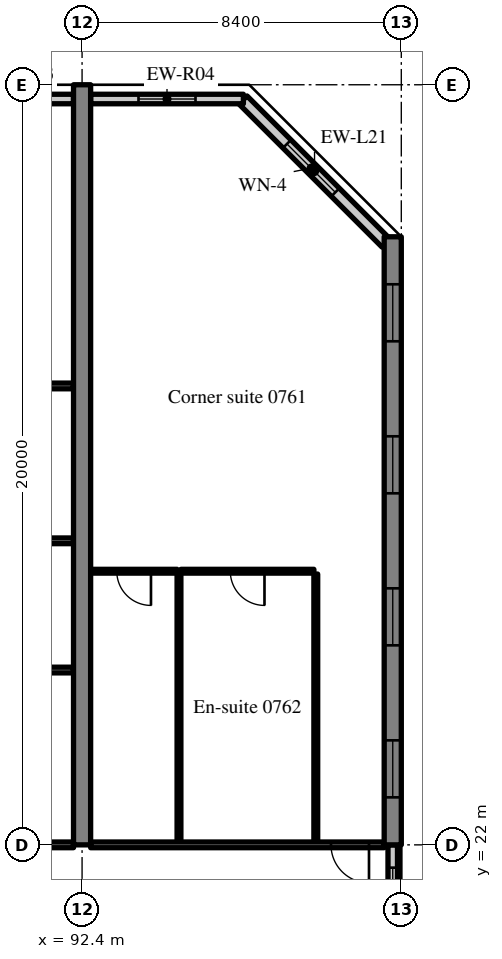
"""IFC4 building model, lengths in metres.
Left out: names, types, materials, properties, quantities, classifications, styles, units other than length and angle.
Written with IfcOpenShell. Run it as: python <this file> out.ifc"""

import sys

from ifc_helpers import new_model, si_unit, direction, frame, frame_2d, origin, place, context, subcontext, project, spatial, rectangle, extrude, source, transform, mapped, element, fill, save


model = new_model("IFC4")
c1 = context("Model", 3, precision=1e-05, world=origin(), true_north=direction((0.0, 1.0)))
c2 = subcontext(c1, "Body", "Model", "MODEL_VIEW")
j1 = project(units=[si_unit("LENGTHUNIT", "METRE"), si_unit("PLANEANGLEUNIT", "RADIAN")], contexts=[c1])
p1 = place(None, origin())
s1 = spatial("IfcSite", under=j1, at=p1, CompositionType="ELEMENT")
p2 = place(p1, origin())
s2 = spatial("IfcBuilding", under=s1, at=p2, CompositionType="ELEMENT")
p3 = place(p2, frame((0.0, 0.0, 35.4)))
s3 = spatial("IfcBuildingStorey", under=s2, at=p3, CompositionType="ELEMENT", Elevation=35.4)
m1 = source(origin(), c2, "Body", "SweptSolid", [
    extrude(rectangle(XDim=20.0, YDim=0.45, at=frame_2d((10.0, 0.0))), origin(), (0.0, 0.0, 1.0), 3.52),
])
p4 = place(p3, frame((92.4, 22.0, 0.0), z_axis=(0.0, 0.0, 1.0), x_axis=(0.0, 1.0, 0.0)))
e1 = element("IfcWall", 1, at=p4, inside=s3, PredefinedType="SHEAR", context=c2, shape_type="MappedRepresentation", body=[
    mapped(m1, transform((0.0, 0.0, 0.0), scale=1.0)),
])
m2 = source(origin(), c2, "Body", "SweptSolid", [
    extrude(rectangle(XDim=16.0, YDim=0.45, at=frame_2d((8.0, 0.0))), origin(), (0.0, 0.0, 1.0), 3.52),
])
p5 = place(p3, frame((100.575, 22.0, 0.0), z_axis=(0.0, 0.0, 1.0), x_axis=(0.0, 1.0, 0.0)))
e2 = element("IfcWall", 2, at=p5, inside=s3, PredefinedType="SHEAR", context=c2, shape_type="MappedRepresentation", body=[
    mapped(m2, transform((0.0, 0.0, 0.0), scale=1.0)),
])
m3 = source(origin(), c2, "Body", "SweptSolid", [
    extrude(rectangle(XDim=1.5, YDim=1.5, at=frame_2d((0.75, 0.75))), frame((0.0, 0.235, 0.0), z_axis=(0.0, -1.0, 0.0), x_axis=(1.0, 0.0, 0.0)), (0.0, 0.0, 1.0), 0.47),
])
p6 = place(p5, frame((1.25, 0.0, 0.9)))
e3 = element("IfcOpeningElement", 3, at=p6, cuts=e2, PredefinedType="OPENING", context=c2, shape_type="MappedRepresentation", body=[
    mapped(m3, transform((0.0, 0.0, 0.0), scale=1.0)),
])
p7 = place(p5, frame((5.25, 0.0, 0.9)))
e4 = element("IfcOpeningElement", 4, at=p7, cuts=e2, PredefinedType="OPENING", context=c2, shape_type="MappedRepresentation", body=[
    mapped(m3, transform((0.0, 0.0, 0.0), scale=1.0)),
])
p8 = place(p5, frame((9.25, 0.0, 0.9)))
e5 = element("IfcOpeningElement", 5, at=p8, cuts=e2, PredefinedType="OPENING", context=c2, shape_type="MappedRepresentation", body=[
    mapped(m3, transform((0.0, 0.0, 0.0), scale=1.0)),
])
p9 = place(p5, frame((13.25, 0.0, 0.9)))
e6 = element("IfcOpeningElement", 6, at=p9, cuts=e2, PredefinedType="OPENING", context=c2, shape_type="MappedRepresentation", body=[
    mapped(m3, transform((0.0, 0.0, 0.0), scale=1.0)),
])
m4 = source(origin(), c2, "Body", "SweptSolid", [
    extrude(rectangle(XDim=5.326, YDim=0.3, at=frame_2d((2.663, 0.0))), origin(), (0.0, 0.0, 1.0), 3.52),
])
p10 = place(p3, frame((100.4, 37.834, 0.0), z_axis=(0.0, 0.0, 1.0), x_axis=(-0.707083859269, 0.707129702361, 0.0)))
e7 = element("IfcWall", 7, at=p10, inside=s3, PredefinedType="SOLIDWALL", context=c2, shape_type="MappedRepresentation", body=[
    mapped(m4, transform((0.0, 0.0, 0.0), scale=1.0)),
])
m5 = source(origin(), c2, "Body", "SweptSolid", [
    extrude(rectangle(XDim=1.8, YDim=1.5, at=frame_2d((0.9, 0.75))), frame((0.0, 0.16, 0.0), z_axis=(0.0, -1.0, 0.0), x_axis=(1.0, 0.0, 0.0)), (0.0, 0.0, 1.0), 0.32),
])
p11 = place(p10, frame((1.889, 0.0, 0.9)))
e8 = element("IfcOpeningElement", 8, at=p11, cuts=e7, PredefinedType="OPENING", context=c2, shape_type="MappedRepresentation", body=[
    mapped(m5, transform((0.0, 0.0, 0.0), scale=1.0)),
])
m6 = source(origin(), c2, "Body", "SweptSolid", [
    extrude(rectangle(XDim=3.525, YDim=0.25, at=frame_2d((1.763, 0.0))), origin(), (0.0, 0.0, 1.0), 2.77),
])
p12 = place(p3, frame((92.175, 41.625, 0.0), z_axis=(0.0, 0.0, 1.0), x_axis=(-1.0, 0.0, 0.0)))
e9 = element("IfcWall", 9, at=p12, inside=s3, PredefinedType="SOLIDWALL", context=c2, shape_type="MappedRepresentation", body=[
    mapped(m6, transform((0.0, 0.0, 0.0), scale=1.0)),
])
m7 = source(origin(), c2, "Body", "SweptSolid", [
    extrude(rectangle(XDim=1.5, YDim=1.5, at=frame_2d((0.75, 0.75))), frame((0.0, 0.135, 0.0), z_axis=(0.0, -1.0, 0.0), x_axis=(1.0, 0.0, 0.0)), (0.0, 0.0, 1.0), 0.27),
])
p13 = place(p12, frame((1.012, 0.0, 0.9)))
e10 = element("IfcOpeningElement", 10, at=p13, cuts=e9, PredefinedType="OPENING", context=c2, shape_type="MappedRepresentation", body=[
    mapped(m7, transform((0.0, 0.0, 0.0), scale=1.0)),
])
m8 = source(origin(), c2, "Body", "SweptSolid", [
    extrude(rectangle(XDim=4.02, YDim=0.25, at=frame_2d((2.01, 0.0))), origin(), (0.0, 0.0, 1.0), 2.77),
])
p14 = place(p3, frame((96.645, 41.625, 0.0), z_axis=(0.0, 0.0, 1.0), x_axis=(-1.0, 0.0, 0.0)))
e11 = element("IfcWall", 11, at=p14, inside=s3, PredefinedType="SOLIDWALL", context=c2, shape_type="MappedRepresentation", body=[
    mapped(m8, transform((0.0, 0.0, 0.0), scale=1.0)),
])
p15 = place(p14, frame((1.26, 0.0, 0.9)))
e12 = element("IfcOpeningElement", 12, at=p15, cuts=e11, PredefinedType="OPENING", context=c2, shape_type="MappedRepresentation", body=[
    mapped(m7, transform((0.0, 0.0, 0.0), scale=1.0)),
])
m9 = source(origin(), c2, "Body", "SweptSolid", [
    extrude(rectangle(XDim=2.4, YDim=0.25, at=frame_2d((1.2, 0.0))), origin(), (0.0, 0.0, 1.0), 2.62),
])
p16 = place(p3, frame((100.575, 19.6, 0.0), z_axis=(0.0, 0.0, 1.0), x_axis=(0.0, 1.0, 0.0)))
e13 = element("IfcWall", 13, at=p16, inside=s3, PredefinedType="SOLIDWALL", context=c2, shape_type="MappedRepresentation", body=[
    mapped(m9, transform((0.0, 0.0, 0.0), scale=1.0)),
])
m10 = source(origin(), c2, "Body", "SweptSolid", [
    extrude(rectangle(XDim=1.2, YDim=1.5, at=frame_2d((0.6, 0.75))), frame((0.0, 0.135, 0.0), z_axis=(0.0, -1.0, 0.0), x_axis=(1.0, 0.0, 0.0)), (0.0, 0.0, 1.0), 0.27),
])
p17 = place(p16, frame((0.6, 0.0, 0.9)))
e14 = element("IfcOpeningElement", 14, at=p17, cuts=e13, PredefinedType="OPENING", context=c2, shape_type="MappedRepresentation", body=[
    mapped(m10, transform((0.0, 0.0, 0.0), scale=1.0)),
])
m11 = source(origin(), c2, "Body", "SweptSolid", [
    extrude(rectangle(XDim=5.4, YDim=0.15, at=frame_2d((2.7, 0.0))), origin(), (0.0, 0.0, 1.0), 2.82),
])
p18 = place(p3, frame((86.775, 22.0, 0.0), z_axis=(0.0, 0.0, 1.0), x_axis=(1.0, 0.0, 0.0)))
e15 = element("IfcWall", 15, at=p18, inside=s3, PredefinedType="PARTITIONING", context=c2, shape_type="MappedRepresentation", body=[
    mapped(m11, transform((0.0, 0.0, 0.0), scale=1.0)),
])
m12 = source(origin(), c2, "Body", "SweptSolid", [
    extrude(rectangle(XDim=5.4, YDim=0.15, at=frame_2d((2.7, 0.0))), origin(), (0.0, 0.0, 1.0), 3.52),
])
for number, where, z_axis, x_axis in (
    (16, (86.775, 26.6, 0.0), (0.0, 0.0, 1.0), (1.0, 0.0, 0.0)),
    (17, (86.775, 30.0, 0.0), (0.0, 0.0, 1.0), (1.0, 0.0, 0.0)),
):
    element("IfcWall", number, at=place(p3, frame(where, z_axis=z_axis, x_axis=x_axis)), inside=s3, PredefinedType="PARTITIONING", context=c2, shape_type="MappedRepresentation", body=[
        mapped(m12, transform((0.0, 0.0, 0.0), scale=1.0)),
    ])
m13 = source(origin(), c2, "Body", "SweptSolid", [
    extrude(rectangle(XDim=7.95, YDim=0.15, at=frame_2d((3.975, 0.0))), origin(), (0.0, 0.0, 1.0), 3.52),
])
p19 = place(p3, frame((84.225, 34.075, 0.0), z_axis=(0.0, 0.0, 1.0), x_axis=(1.0, 0.0, 0.0)))
e18 = element("IfcWall", 18, at=p19, inside=s3, PredefinedType="PARTITIONING", context=c2, shape_type="MappedRepresentation", body=[
    mapped(m13, transform((0.0, 0.0, 0.0), scale=1.0)),
])
m14 = source(origin(), c2, "Body", "SweptSolid", [
    extrude(rectangle(XDim=1.0, YDim=2.1, at=frame_2d((0.5, 1.05))), frame((0.0, 0.085, 0.0), z_axis=(0.0, -1.0, 0.0), x_axis=(1.0, 0.0, 0.0)), (0.0, 0.0, 1.0), 0.17),
])
p20 = place(p19, frame((0.7, 0.0, 0.0)))
e19 = element("IfcOpeningElement", 19, at=p20, cuts=e18, PredefinedType="OPENING", context=c2, shape_type="MappedRepresentation", body=[
    mapped(m14, transform((0.0, 0.0, 0.0), scale=1.0)),
])
m15 = source(origin(), c2, "Body", "SweptSolid", [
    extrude(rectangle(XDim=7.05, YDim=0.1, at=frame_2d((3.525, 0.0))), origin(), (0.0, 0.0, 1.0), 3.52),
])
for number, where, z_axis, x_axis in (
    (20, (98.55, 22.075, 0.0), (0.0, 0.0, 1.0), (0.0, 1.0, 0.0)),
    (21, (94.95, 22.075, 0.0), (0.0, 0.0, 1.0), (0.0, 1.0, 0.0)),
):
    element("IfcWall", number, at=place(p3, frame(where, z_axis=z_axis, x_axis=x_axis)), inside=s3, PredefinedType="PARTITIONING", context=c2, shape_type="MappedRepresentation", body=[
        mapped(m15, transform((0.0, 0.0, 0.0), scale=1.0)),
    ])
m16 = source(origin(), c2, "Body", "SweptSolid", [
    extrude(rectangle(XDim=3.5, YDim=0.1, at=frame_2d((1.75, 0.0))), origin(), (0.0, 0.0, 1.0), 3.52),
])
p21 = place(p3, frame((95.0, 29.2, 0.0), z_axis=(0.0, 0.0, 1.0), x_axis=(1.0, 0.0, 0.0)))
e22 = element("IfcWall", 22, at=p21, inside=s3, PredefinedType="PARTITIONING", context=c2, shape_type="MappedRepresentation", body=[
    mapped(m16, transform((0.0, 0.0, 0.0), scale=1.0)),
])
m17 = source(origin(), c2, "Body", "SweptSolid", [
    extrude(rectangle(XDim=0.9, YDim=2.1, at=frame_2d((0.45, 1.05))), frame((0.0, 0.06, 0.0), z_axis=(0.0, -1.0, 0.0), x_axis=(1.0, 0.0, 0.0)), (0.0, 0.0, 1.0), 0.12),
])
p22 = place(p21, frame((1.3, 0.0, 0.0)))
e23 = element("IfcOpeningElement", 23, at=p22, cuts=e22, PredefinedType="OPENING", context=c2, shape_type="MappedRepresentation", body=[
    mapped(m17, transform((0.0, 0.0, 0.0), scale=1.0)),
])
m18 = source(origin(), c2, "Body", "SweptSolid", [
    extrude(rectangle(XDim=2.275, YDim=0.1, at=frame_2d((1.137, 0.0))), origin(), (0.0, 0.0, 1.0), 3.52),
])
p23 = place(p3, frame((92.625, 29.2, 0.0), z_axis=(0.0, 0.0, 1.0), x_axis=(1.0, 0.0, 0.0)))
e24 = element("IfcWall", 24, at=p23, inside=s3, PredefinedType="PARTITIONING", context=c2, shape_type="MappedRepresentation", body=[
    mapped(m18, transform((0.0, 0.0, 0.0), scale=1.0)),
])
p24 = place(p23, frame((0.688, 0.0, 0.0)))
e25 = element("IfcOpeningElement", 25, at=p24, cuts=e24, PredefinedType="OPENING", context=c2, shape_type="MappedRepresentation", body=[
    mapped(m17, transform((0.0, 0.0, 0.0), scale=1.0)),
])
m19 = source(origin(), c2, "Body", "SweptSolid", [
    extrude(rectangle(XDim=7.725, YDim=0.15, at=frame_2d((3.863, 0.0))), origin(), (0.0, 0.0, 1.0), 2.82),
])
p25 = place(p3, frame((92.625, 22.0, 0.0), z_axis=(0.0, 0.0, 1.0), x_axis=(1.0, 0.0, 0.0)))
e26 = element("IfcWall", 26, at=p25, inside=s3, PredefinedType="PARTITIONING", context=c2, shape_type="MappedRepresentation", body=[
    mapped(m19, transform((0.0, 0.0, 0.0), scale=1.0)),
])
p26 = place(p25, frame((6.325, 0.0, 0.0)))
e27 = element("IfcOpeningElement", 27, at=p26, cuts=e26, PredefinedType="OPENING", context=c2, shape_type="MappedRepresentation", body=[
    mapped(m14, transform((0.0, 0.0, 0.0), scale=1.0)),
])
m20 = source(origin(), c2, "Body", "SweptSolid", [
    extrude(rectangle(XDim=1.8, YDim=1.5, at=frame_2d((0.9, 0.75))), frame((0.0, 0.03, 0.0), z_axis=(0.0, -1.0, 0.0), x_axis=(1.0, 0.0, 0.0)), (0.0, 0.0, 1.0), 0.06),
])
p27 = place(p11, origin())
e28 = element("IfcWindow", 28, at=p27, inside=s3, PartitioningType="SINGLE_PANEL", PredefinedType="WINDOW", context=c2, shape_type="MappedRepresentation", body=[
    mapped(m20, transform((0.0, 0.0, 0.0), scale=1.0)),
])
fill(e8, e28)
m21 = source(origin(), c2, "Body", "SweptSolid", [
    extrude(rectangle(XDim=1.5, YDim=1.5, at=frame_2d((0.75, 0.75))), frame((0.0, 0.03, 0.0), z_axis=(0.0, -1.0, 0.0), x_axis=(1.0, 0.0, 0.0)), (0.0, 0.0, 1.0), 0.06),
])
p28 = place(p15, origin())
e29 = element("IfcWindow", 29, at=p28, inside=s3, PartitioningType="SINGLE_PANEL", PredefinedType="WINDOW", context=c2, shape_type="MappedRepresentation", body=[
    mapped(m21, transform((0.0, 0.0, 0.0), scale=1.0)),
])
fill(e12, e29)
p29 = place(p6, origin())
e30 = element("IfcWindow", 30, at=p29, inside=s3, PartitioningType="SINGLE_PANEL", PredefinedType="WINDOW", context=c2, shape_type="MappedRepresentation", body=[
    mapped(m21, transform((0.0, 0.0, 0.0), scale=1.0)),
])
fill(e3, e30)
p30 = place(p7, origin())
e31 = element("IfcWindow", 31, at=p30, inside=s3, PartitioningType="SINGLE_PANEL", PredefinedType="WINDOW", context=c2, shape_type="MappedRepresentation", body=[
    mapped(m21, transform((0.0, 0.0, 0.0), scale=1.0)),
])
fill(e4, e31)
p31 = place(p8, origin())
e32 = element("IfcWindow", 32, at=p31, inside=s3, PartitioningType="SINGLE_PANEL", PredefinedType="WINDOW", context=c2, shape_type="MappedRepresentation", body=[
    mapped(m21, transform((0.0, 0.0, 0.0), scale=1.0)),
])
fill(e5, e32)
p32 = place(p9, origin())
e33 = element("IfcWindow", 33, at=p32, inside=s3, PartitioningType="SINGLE_PANEL", PredefinedType="WINDOW", context=c2, shape_type="MappedRepresentation", body=[
    mapped(m21, transform((0.0, 0.0, 0.0), scale=1.0)),
])
fill(e6, e33)
m22 = source(origin(), c2, "Body", "SweptSolid", [
    extrude(rectangle(XDim=1.2, YDim=1.5, at=frame_2d((0.6, 0.75))), frame((0.0, 0.03, 0.0), z_axis=(0.0, -1.0, 0.0), x_axis=(1.0, 0.0, 0.0)), (0.0, 0.0, 1.0), 0.06),
])
p33 = place(p17, origin())
e34 = element("IfcWindow", 34, at=p33, inside=s3, PartitioningType="SINGLE_PANEL", PredefinedType="WINDOW", context=c2, shape_type="MappedRepresentation", body=[
    mapped(m22, transform((0.0, 0.0, 0.0), scale=1.0)),
])
fill(e14, e34)
m23 = source(origin(), c2, "Body", "SweptSolid", [
    extrude(rectangle(XDim=0.9, YDim=2.1, at=frame_2d((0.45, 1.05))), frame((0.0, 0.025, 0.0), z_axis=(0.0, -1.0, 0.0), x_axis=(1.0, 0.0, 0.0)), (0.0, 0.0, 1.0), 0.05),
])
p34 = place(p22, origin())
e35 = element("IfcDoor", 35, at=p34, inside=s3, OperationType="SINGLE_SWING_RIGHT", PredefinedType="DOOR", context=c2, shape_type="MappedRepresentation", body=[
    mapped(m23, transform((0.0, 0.0, 0.0), scale=1.0)),
])
fill(e23, e35)
p35 = place(p24, origin())
e36 = element("IfcDoor", 36, at=p35, inside=s3, OperationType="SINGLE_SWING_RIGHT", PredefinedType="DOOR", context=c2, shape_type="MappedRepresentation", body=[
    mapped(m23, transform((0.0, 0.0, 0.0), scale=1.0)),
])
fill(e25, e36)
m24 = source(origin(), c2, "Body", "SweptSolid", [
    extrude(rectangle(XDim=1.0, YDim=2.1, at=frame_2d((0.5, 1.05))), frame((0.0, 0.025, 0.0), z_axis=(0.0, -1.0, 0.0), x_axis=(1.0, 0.0, 0.0)), (0.0, 0.0, 1.0), 0.05),
])
p36 = place(p26, origin())
e37 = element("IfcDoor", 37, at=p36, inside=s3, OperationType="SINGLE_SWING_RIGHT", PredefinedType="DOOR", context=c2, shape_type="MappedRepresentation", body=[
    mapped(m24, transform((0.0, 0.0, 0.0), scale=1.0)),
])
fill(e27, e37)
save(model, sys.argv[1])
